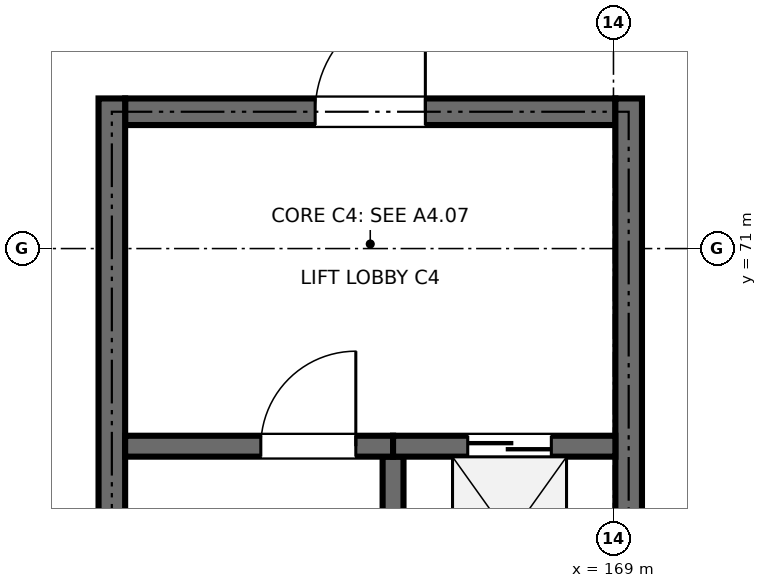
"""IFC4 building model, lengths in metres.
Left out: names, types, materials, properties, quantities, classifications, styles, units other than length and angle.
Written with IfcOpenShell. Run it as: python <this file> out.ifc"""

import sys

from ifc_helpers import new_model, si_unit, direction, frame, frame_2d, origin, place, context, subcontext, project, spatial, rectangle, extrude, element, fill, save


model = new_model("IFC4")
c1 = context("Model", 3, precision=1e-05, world=origin(), true_north=direction((0.0, 1.0)))
c2 = subcontext(c1, "Body", "Model", "MODEL_VIEW")
j1 = project(units=[si_unit("LENGTHUNIT", "METRE"), si_unit("PLANEANGLEUNIT", "RADIAN")], contexts=[c1])
p1 = place(None, origin())
s1 = spatial("IfcSite", under=j1, at=p1, CompositionType="ELEMENT")
p2 = place(p1, origin())
s2 = spatial("IfcBuilding", under=s1, at=p2, CompositionType="ELEMENT")
p3 = place(p2, frame((0.0, 0.0, -4.8)))
s3 = spatial("IfcBuildingStorey", under=s2, at=p3, CompositionType="ELEMENT", Elevation=-4.8)
p4 = place(p3, frame((162.575, 72.8, 0.0), z_axis=(0.0, 0.0, 1.0), x_axis=(1.0, 0.0, 0.0)))
e1 = element("IfcWall", 1, at=p4, inside=s3, PredefinedType="SHEAR", context=c2, shape_type="SweptSolid", body=[
    extrude(rectangle(XDim=6.45, YDim=0.35, at=frame_2d((3.225, 0.0))), origin(), (0.0, 0.0, 1.0), 4.5),
])
p5 = place(p4, frame((2.5, 0.0, 0.0)))
e2 = element("IfcOpeningElement", 2, at=p5, cuts=e1, PredefinedType="OPENING", context=c2, shape_type="SweptSolid", body=[
    extrude(rectangle(XDim=1.45, YDim=2.2, at=frame_2d((0.725, 1.1))), frame((0.0, 0.185, 0.0), z_axis=(0.0, -1.0, 0.0), x_axis=(1.0, 0.0, 0.0)), (0.0, 0.0, 1.0), 0.37),
])
for number, where, z_axis, x_axis in (
    (3, (162.4, 61.375, 0.0), (0.0, 0.0, 1.0), (0.0, 1.0, 0.0)),
    (4, (169.2, 61.375, 0.0), (0.0, 0.0, 1.0), (0.0, 1.0, 0.0)),
):
    element("IfcWall", number, at=place(p3, frame(where, z_axis=z_axis, x_axis=x_axis)), inside=s3, PredefinedType="SHEAR", context=c2, shape_type="SweptSolid", body=[
        extrude(rectangle(XDim=11.6, YDim=0.35, at=frame_2d((5.8, 0.0))), origin(), (0.0, 0.0, 1.0), 4.5),
    ])
p6 = place(p3, frame((166.1, 61.375, 0.0), z_axis=(0.0, 0.0, 1.0), x_axis=(0.0, 1.0, 0.0)))
e5 = element("IfcWall", 5, at=p6, inside=s3, PredefinedType="SHEAR", context=c2, shape_type="SweptSolid", body=[
    extrude(rectangle(XDim=6.887, YDim=0.275, at=frame_2d((3.444, 0.0))), origin(), (0.0, 0.0, 1.0), 4.5),
])
p7 = place(p3, frame((162.575, 68.4, 0.0), z_axis=(0.0, 0.0, 1.0), x_axis=(1.0, 0.0, 0.0)))
e6 = element("IfcWall", 6, at=p7, inside=s3, PredefinedType="SHEAR", context=c2, shape_type="SweptSolid", body=[
    extrude(rectangle(XDim=3.525, YDim=0.275, at=frame_2d((1.763, 0.0))), origin(), (0.0, 0.0, 1.0), 4.5),
])
p8 = place(p7, frame((1.785, 0.0, 0.0)))
e7 = element("IfcOpeningElement", 7, at=p8, cuts=e6, PredefinedType="OPENING", context=c2, shape_type="SweptSolid", body=[
    extrude(rectangle(XDim=1.25, YDim=2.15, at=frame_2d((0.625, 1.075))), frame((0.0, 0.147, 0.0), z_axis=(0.0, -1.0, 0.0), x_axis=(1.0, 0.0, 0.0)), (0.0, 0.0, 1.0), 0.295),
])
p9 = place(p3, frame((166.1, 68.4, 0.0), z_axis=(0.0, 0.0, 1.0), x_axis=(1.0, 0.0, 0.0)))
e8 = element("IfcWall", 8, at=p9, inside=s3, PredefinedType="SHEAR", context=c2, shape_type="SweptSolid", body=[
    extrude(rectangle(XDim=2.925, YDim=0.275, at=frame_2d((1.462, 0.0))), origin(), (0.0, 0.0, 1.0), 4.5),
])
p10 = place(p9, frame((0.982, 0.0, 0.0)))
e9 = element("IfcOpeningElement", 9, at=p10, cuts=e8, PredefinedType="OPENING", context=c2, shape_type="SweptSolid", body=[
    extrude(rectangle(XDim=1.1, YDim=2.15, at=frame_2d((0.55, 1.075))), frame((0.0, 0.147, 0.0), z_axis=(0.0, -1.0, 0.0), x_axis=(1.0, 0.0, 0.0)), (0.0, 0.0, 1.0), 0.295),
])
p11 = place(p8, origin())
e10 = element("IfcDoor", 10, at=p11, inside=s3, OperationType="SINGLE_SWING_RIGHT", PredefinedType="DOOR", context=c2, shape_type="SweptSolid", body=[
    extrude(rectangle(XDim=1.25, YDim=2.15, at=frame_2d((0.625, 1.075))), frame((0.0, 0.025, 0.0), z_axis=(0.0, -1.0, 0.0), x_axis=(1.0, 0.0, 0.0)), (0.0, 0.0, 1.0), 0.05),
])
fill(e7, e10)
p12 = place(p10, origin())
e11 = element("IfcDoor", 11, at=p12, inside=s3, OperationType="DOUBLE_DOOR_SLIDING", PredefinedType="DOOR", context=c2, shape_type="SweptSolid", body=[
    extrude(rectangle(XDim=1.1, YDim=2.15, at=frame_2d((0.55, 1.075))), frame((0.0, 0.025, 0.0), z_axis=(0.0, -1.0, 0.0), x_axis=(1.0, 0.0, 0.0)), (0.0, 0.0, 1.0), 0.05),
])
fill(e9, e11)
p13 = place(p5, origin())
e12 = element("IfcDoor", 12, at=p13, inside=s3, OperationType="SINGLE_SWING_RIGHT", PredefinedType="DOOR", context=c2, shape_type="SweptSolid", body=[
    extrude(rectangle(XDim=1.45, YDim=2.2, at=frame_2d((0.725, 1.1))), frame((0.0, 0.025, 0.0), z_axis=(0.0, -1.0, 0.0), x_axis=(1.0, 0.0, 0.0)), (0.0, 0.0, 1.0), 0.05),
])
fill(e2, e12)
save(model, sys.argv[1])
